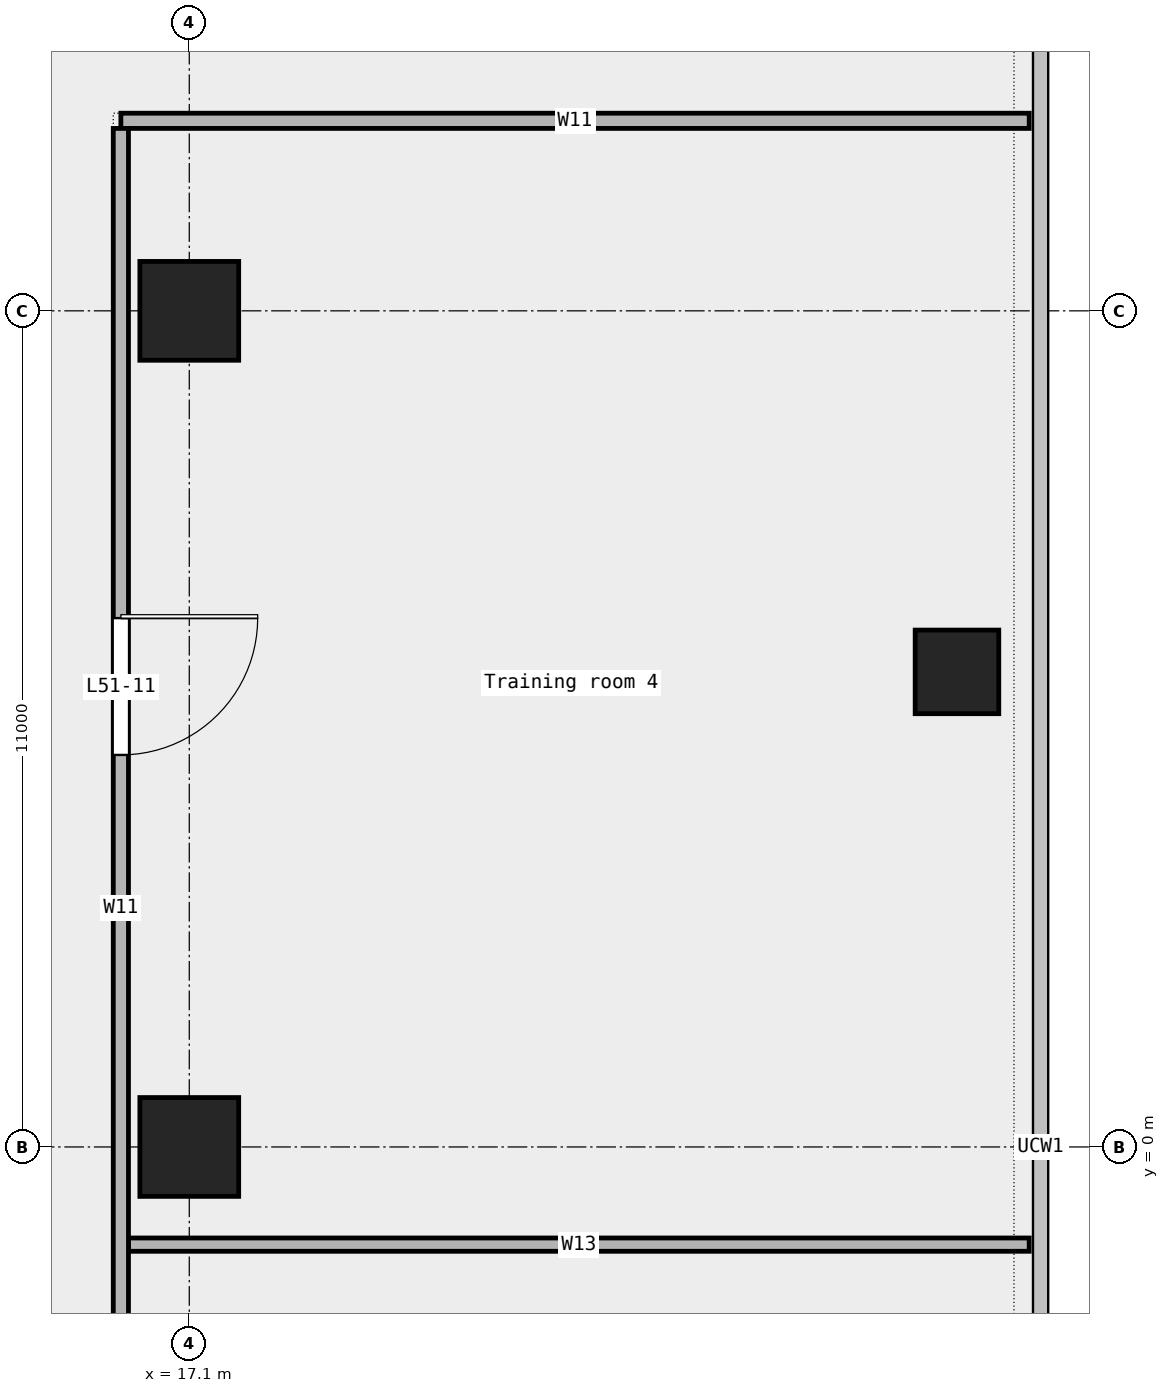
"""IFC4 building model, lengths in metres.
Left out: names, types, materials, properties, quantities, classifications, styles, units other than length and angle.
Written with IfcOpenShell. Run it as: python <this file> out.ifc"""

import sys

from ifc_helpers import new_model, si_unit, direction, frame, frame_2d, origin, origin_2d, place, context, subcontext, project, spatial, rectangle, extrude, element, fill, save


model = new_model("IFC4")
c1 = context("Model", 3, precision=1e-05, world=origin(), true_north=direction((0.0, 1.0)))
c2 = subcontext(c1, "Body", "Model", "MODEL_VIEW")
j1 = project(units=[si_unit("LENGTHUNIT", "METRE"), si_unit("PLANEANGLEUNIT", "RADIAN")], contexts=[c1])
p1 = place(None, origin())
s1 = spatial("IfcSite", under=j1, at=p1, CompositionType="ELEMENT")
p2 = place(p1, origin())
s2 = spatial("IfcBuilding", under=s1, at=p2, CompositionType="ELEMENT")
p3 = place(p2, frame((0.0, 0.0, 239.0)))
s3 = spatial("IfcBuildingStorey", under=s2, at=p3, CompositionType="ELEMENT", Elevation=239.0)
p4 = place(p3, frame((27.2, 6.25, 0.0), z_axis=(0.0, 0.0, 1.0), x_axis=(1.0, 0.0, 0.0)))
e1 = element("IfcColumn", 1, at=p4, inside=s3, PredefinedType="COLUMN", context=c2, shape_type="SweptSolid", body=[
    extrude(rectangle(XDim=1.1, YDim=1.1, at=origin_2d()), origin(), (0.0, 0.0, 1.0), 3.6),
])
for number, where, z_axis, x_axis in (
    (2, (17.1, 0.0, 0.0), (0.0, 0.0, 1.0), (1.0, 0.0, 0.0)),
    (3, (17.1, 11.0, 0.0), (0.0, 0.0, 1.0), (1.0, 0.0, 0.0)),
):
    element("IfcColumn", number, at=place(p3, frame(where, z_axis=z_axis, x_axis=x_axis)), inside=s3, PredefinedType="COLUMN", context=c2, shape_type="SweptSolid", body=[
        extrude(rectangle(XDim=1.3, YDim=1.3, at=origin_2d()), origin(), (0.0, 0.0, 1.0), 3.6),
    ])
p5 = place(p3, frame((16.3, -1.285, 0.0), z_axis=(0.0, 0.0, 1.0), x_axis=(1.0, 0.0, 0.0)))
e4 = element("IfcWall", 4, at=p5, inside=s3, PredefinedType="PARTITIONING", context=c2, shape_type="SweptSolid", body=[
    extrude(rectangle(XDim=11.85, YDim=0.175, at=frame_2d((5.925, 0.0))), origin(), (0.0, 0.0, 1.0), 3.6),
])
p6 = place(p3, frame((16.2, 13.5, 0.0), z_axis=(0.0, 0.0, 1.0), x_axis=(1.0, 0.0, 0.0)))
e5 = element("IfcWall", 5, at=p6, inside=s3, PredefinedType="PARTITIONING", context=c2, shape_type="SweptSolid", body=[
    extrude(rectangle(XDim=11.95, YDim=0.2, at=frame_2d((5.975, 0.0))), origin(), (0.0, 0.0, 1.0), 3.6),
])
p7 = place(p3, frame((16.2, -7.1, 0.0), z_axis=(0.0, 0.0, 1.0), x_axis=(0.0, 1.0, 0.0)))
e6 = element("IfcWall", 6, at=p7, inside=s3, PredefinedType="PARTITIONING", context=c2, shape_type="SweptSolid", body=[
    extrude(rectangle(XDim=20.5, YDim=0.2, at=frame_2d((10.25, 0.0))), origin(), (0.0, 0.0, 1.0), 3.6),
])
p8 = place(p7, frame((12.258, 0.0, 0.0)))
e7 = element("IfcOpeningElement", 7, at=p8, cuts=e6, PredefinedType="OPENING", context=c2, shape_type="SweptSolid", body=[
    extrude(rectangle(XDim=1.8, YDim=2.1, at=frame_2d((0.9, 1.05))), frame((0.0, 0.112, 0.0), z_axis=(0.0, -1.0, 0.0), x_axis=(1.0, 0.0, 0.0)), (0.0, 0.0, 1.0), 0.224),
])
p9 = place(p8, origin())
e8 = element("IfcDoor", 8, at=p9, inside=s3, OperationType="DOUBLE_DOOR_SINGLE_SWING", PredefinedType="DOOR", context=c2, shape_type="SweptSolid", body=[
    extrude(rectangle(XDim=1.8, YDim=2.1, at=frame_2d((0.9, 1.05))), frame((0.0, 0.025, 0.0), z_axis=(0.0, -1.0, 0.0), x_axis=(1.0, 0.0, 0.0)), (0.0, 0.0, 1.0), 0.05),
])
fill(e7, e8)
save(model, sys.argv[1])
